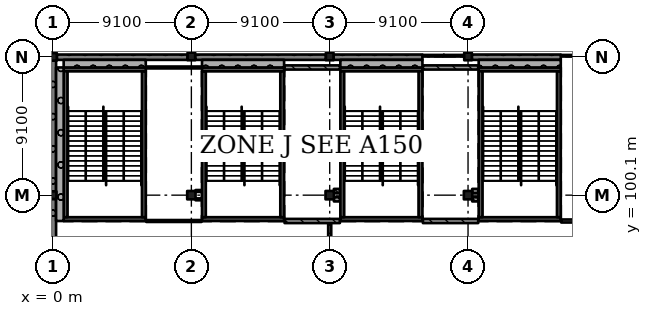
"""IFC4 building model, lengths in metres.
Left out: names, types, materials, properties, quantities, classifications, styles, units other than length and angle.
Written with IfcOpenShell. Run it as: python <this file> out.ifc"""

import sys

from ifc_helpers import new_model, si_unit, direction, frame, frame_2d, origin, origin_2d, place, context, subcontext, project, spatial, rectangle, extrude, element, fill, save


model = new_model("IFC4")
c1 = context("Model", 3, precision=1e-05, world=origin(), true_north=direction((0.0, 1.0)))
c2 = subcontext(c1, "Body", "Model", "MODEL_VIEW")
j1 = project(units=[si_unit("LENGTHUNIT", "METRE"), si_unit("PLANEANGLEUNIT", "RADIAN")], contexts=[c1])
p1 = place(None, origin())
s1 = spatial("IfcSite", under=j1, at=p1, CompositionType="ELEMENT")
p2 = place(p1, origin())
s2 = spatial("IfcBuilding", under=s1, at=p2, CompositionType="ELEMENT")
p3 = place(p2, frame((0.0, 0.0, 15.47)))
s3 = spatial("IfcBuildingStorey", under=s2, at=p3, CompositionType="ELEMENT", Elevation=15.47)
for number, where, z_axis, x_axis in (
    (1, (-0.025, 100.1, 0.0), (0.0, 0.0, 1.0), (1.0, 0.0, 0.0)),
    (2, (0.0, 109.2, 0.0), (0.0, 0.0, 1.0), (1.0, 0.0, 0.0)),
):
    element("IfcColumn", number, at=place(p3, frame(where, z_axis=z_axis, x_axis=x_axis)), inside=s3, PredefinedType="COLUMN", context=c2, shape_type="SweptSolid", body=[
        extrude(rectangle(XDim=0.5, YDim=0.5, at=origin_2d()), origin(), (0.0, 0.0, 1.0), 4.55),
    ])
p4 = place(p3, frame((9.1, 100.1, 0.0), z_axis=(0.0, 0.0, 1.0), x_axis=(1.0, 0.0, 0.0)))
e3 = element("IfcColumn", 3, at=p4, inside=s3, PredefinedType="COLUMN", context=c2, shape_type="SweptSolid", body=[
    extrude(rectangle(XDim=0.55, YDim=0.55, at=origin_2d()), origin(), (0.0, 0.0, 1.0), 4.55),
])
p5 = place(p3, frame((9.1, 109.225, 0.0), z_axis=(0.0, 0.0, 1.0), x_axis=(1.0, 0.0, 0.0)))
e4 = element("IfcColumn", 4, at=p5, inside=s3, PredefinedType="COLUMN", context=c2, shape_type="SweptSolid", body=[
    extrude(rectangle(XDim=0.5, YDim=0.5, at=origin_2d()), origin(), (0.0, 0.0, 1.0), 4.55),
])
p6 = place(p3, frame((18.2, 100.1, 0.0), z_axis=(0.0, 0.0, 1.0), x_axis=(1.0, 0.0, 0.0)))
e5 = element("IfcColumn", 5, at=p6, inside=s3, PredefinedType="COLUMN", context=c2, shape_type="SweptSolid", body=[
    extrude(rectangle(XDim=0.55, YDim=0.55, at=origin_2d()), origin(), (0.0, 0.0, 1.0), 4.55),
])
p7 = place(p3, frame((18.2, 109.225, 0.0), z_axis=(0.0, 0.0, 1.0), x_axis=(1.0, 0.0, 0.0)))
e6 = element("IfcColumn", 6, at=p7, inside=s3, PredefinedType="COLUMN", context=c2, shape_type="SweptSolid", body=[
    extrude(rectangle(XDim=0.5, YDim=0.5, at=origin_2d()), origin(), (0.0, 0.0, 1.0), 4.55),
])
p8 = place(p3, frame((27.3, 100.1, 0.0), z_axis=(0.0, 0.0, 1.0), x_axis=(1.0, 0.0, 0.0)))
e7 = element("IfcColumn", 7, at=p8, inside=s3, PredefinedType="COLUMN", context=c2, shape_type="SweptSolid", body=[
    extrude(rectangle(XDim=0.55, YDim=0.55, at=origin_2d()), origin(), (0.0, 0.0, 1.0), 4.55),
])
p9 = place(p3, frame((27.3, 109.225, 0.0), z_axis=(0.0, 0.0, 1.0), x_axis=(1.0, 0.0, 0.0)))
e8 = element("IfcColumn", 8, at=p9, inside=s3, PredefinedType="COLUMN", context=c2, shape_type="SweptSolid", body=[
    extrude(rectangle(XDim=0.5, YDim=0.5, at=origin_2d()), origin(), (0.0, 0.0, 1.0), 4.55),
])
p10 = place(p3, frame((6.1, 98.525, 0.0), z_axis=(0.0, 0.0, 1.0), x_axis=(-1.0, 0.0, 0.0)))
e9 = element("IfcWall", 9, at=p10, inside=s3, PredefinedType="SHEAR", context=c2, shape_type="SweptSolid", body=[
    extrude(rectangle(XDim=5.4, YDim=0.25, at=frame_2d((2.7, 0.0))), origin(), (0.0, 0.0, 1.0), 4.55),
])
p11 = place(p10, frame((1.5, 0.0, 0.0)))
e10 = element("IfcOpeningElement", 10, at=p11, cuts=e9, PredefinedType="OPENING", context=c2, shape_type="SweptSolid", body=[
    extrude(rectangle(XDim=2.4, YDim=2.1, at=frame_2d((1.2, 1.05))), frame((0.0, 0.135, 0.0), z_axis=(0.0, -1.0, 0.0), x_axis=(1.0, 0.0, 0.0)), (0.0, 0.0, 1.0), 0.27),
])
p12 = place(p3, frame((6.1, 108.375, 0.0), z_axis=(0.0, 0.0, 1.0), x_axis=(-1.0, 0.0, 0.0)))
e11 = element("IfcWall", 11, at=p12, inside=s3, PredefinedType="SHEAR", context=c2, shape_type="SweptSolid", body=[
    extrude(rectangle(XDim=5.4, YDim=0.25, at=frame_2d((2.7, 0.0))), origin(), (0.0, 0.0, 1.0), 4.55),
])
for number, where, z_axis, x_axis in (
    (12, (0.825, 108.25, 0.0), (0.0, 0.0, 1.0), (0.0, -1.0, 0.0)),
    (13, (5.975, 108.25, 0.0), (0.0, 0.0, 1.0), (0.0, -1.0, 0.0)),
):
    element("IfcWall", number, at=place(p3, frame(where, z_axis=z_axis, x_axis=x_axis)), inside=s3, PredefinedType="SHEAR", context=c2, shape_type="SweptSolid", body=[
        extrude(rectangle(XDim=9.6, YDim=0.25, at=frame_2d((4.8, 0.0))), origin(), (0.0, 0.0, 1.0), 4.55),
    ])
p13 = place(p3, frame((15.2, 98.525, 0.0), z_axis=(0.0, 0.0, 1.0), x_axis=(-1.0, 0.0, 0.0)))
e14 = element("IfcWall", 14, at=p13, inside=s3, PredefinedType="SHEAR", context=c2, shape_type="SweptSolid", body=[
    extrude(rectangle(XDim=5.4, YDim=0.25, at=frame_2d((2.7, 0.0))), origin(), (0.0, 0.0, 1.0), 4.55),
])
p14 = place(p13, frame((1.5, 0.0, 0.0)))
e15 = element("IfcOpeningElement", 15, at=p14, cuts=e14, PredefinedType="OPENING", context=c2, shape_type="SweptSolid", body=[
    extrude(rectangle(XDim=2.4, YDim=2.1, at=frame_2d((1.2, 1.05))), frame((0.0, 0.135, 0.0), z_axis=(0.0, -1.0, 0.0), x_axis=(1.0, 0.0, 0.0)), (0.0, 0.0, 1.0), 0.27),
])
p15 = place(p3, frame((15.2, 108.375, 0.0), z_axis=(0.0, 0.0, 1.0), x_axis=(-1.0, 0.0, 0.0)))
e16 = element("IfcWall", 16, at=p15, inside=s3, PredefinedType="SHEAR", context=c2, shape_type="SweptSolid", body=[
    extrude(rectangle(XDim=5.4, YDim=0.25, at=frame_2d((2.7, 0.0))), origin(), (0.0, 0.0, 1.0), 4.55),
])
for number, where, z_axis, x_axis in (
    (17, (9.925, 108.25, 0.0), (0.0, 0.0, 1.0), (0.0, -1.0, 0.0)),
    (18, (15.075, 108.25, 0.0), (0.0, 0.0, 1.0), (0.0, -1.0, 0.0)),
):
    element("IfcWall", number, at=place(p3, frame(where, z_axis=z_axis, x_axis=x_axis)), inside=s3, PredefinedType="SHEAR", context=c2, shape_type="SweptSolid", body=[
        extrude(rectangle(XDim=9.6, YDim=0.25, at=frame_2d((4.8, 0.0))), origin(), (0.0, 0.0, 1.0), 4.55),
    ])
p16 = place(p3, frame((24.3, 98.525, 0.0), z_axis=(0.0, 0.0, 1.0), x_axis=(-1.0, 0.0, 0.0)))
e19 = element("IfcWall", 19, at=p16, inside=s3, PredefinedType="SHEAR", context=c2, shape_type="SweptSolid", body=[
    extrude(rectangle(XDim=5.4, YDim=0.25, at=frame_2d((2.7, 0.0))), origin(), (0.0, 0.0, 1.0), 4.55),
])
p17 = place(p16, frame((1.5, 0.0, 0.0)))
e20 = element("IfcOpeningElement", 20, at=p17, cuts=e19, PredefinedType="OPENING", context=c2, shape_type="SweptSolid", body=[
    extrude(rectangle(XDim=2.4, YDim=2.1, at=frame_2d((1.2, 1.05))), frame((0.0, 0.135, 0.0), z_axis=(0.0, -1.0, 0.0), x_axis=(1.0, 0.0, 0.0)), (0.0, 0.0, 1.0), 0.27),
])
p18 = place(p3, frame((24.3, 108.375, 0.0), z_axis=(0.0, 0.0, 1.0), x_axis=(-1.0, 0.0, 0.0)))
e21 = element("IfcWall", 21, at=p18, inside=s3, PredefinedType="SHEAR", context=c2, shape_type="SweptSolid", body=[
    extrude(rectangle(XDim=5.4, YDim=0.25, at=frame_2d((2.7, 0.0))), origin(), (0.0, 0.0, 1.0), 4.55),
])
for number, where, z_axis, x_axis in (
    (22, (19.025, 108.25, 0.0), (0.0, 0.0, 1.0), (0.0, -1.0, 0.0)),
    (23, (24.175, 108.25, 0.0), (0.0, 0.0, 1.0), (0.0, -1.0, 0.0)),
):
    element("IfcWall", number, at=place(p3, frame(where, z_axis=z_axis, x_axis=x_axis)), inside=s3, PredefinedType="SHEAR", context=c2, shape_type="SweptSolid", body=[
        extrude(rectangle(XDim=9.6, YDim=0.25, at=frame_2d((4.8, 0.0))), origin(), (0.0, 0.0, 1.0), 4.55),
    ])
p19 = place(p3, frame((33.4, 98.525, 0.0), z_axis=(0.0, 0.0, 1.0), x_axis=(-1.0, 0.0, 0.0)))
e24 = element("IfcWall", 24, at=p19, inside=s3, PredefinedType="SHEAR", context=c2, shape_type="SweptSolid", body=[
    extrude(rectangle(XDim=5.4, YDim=0.25, at=frame_2d((2.7, 0.0))), origin(), (0.0, 0.0, 1.0), 4.55),
])
p20 = place(p19, frame((1.5, 0.0, 0.0)))
e25 = element("IfcOpeningElement", 25, at=p20, cuts=e24, PredefinedType="OPENING", context=c2, shape_type="SweptSolid", body=[
    extrude(rectangle(XDim=2.4, YDim=2.1, at=frame_2d((1.2, 1.05))), frame((0.0, 0.135, 0.0), z_axis=(0.0, -1.0, 0.0), x_axis=(1.0, 0.0, 0.0)), (0.0, 0.0, 1.0), 0.27),
])
p21 = place(p3, frame((33.4, 108.375, 0.0), z_axis=(0.0, 0.0, 1.0), x_axis=(-1.0, 0.0, 0.0)))
e26 = element("IfcWall", 26, at=p21, inside=s3, PredefinedType="SHEAR", context=c2, shape_type="SweptSolid", body=[
    extrude(rectangle(XDim=5.4, YDim=0.25, at=frame_2d((2.7, 0.0))), origin(), (0.0, 0.0, 1.0), 4.55),
])
for number, where, z_axis, x_axis in (
    (27, (28.125, 108.25, 0.0), (0.0, 0.0, 1.0), (0.0, -1.0, 0.0)),
    (28, (33.275, 108.25, 0.0), (0.0, 0.0, 1.0), (0.0, -1.0, 0.0)),
):
    element("IfcWall", number, at=place(p3, frame(where, z_axis=z_axis, x_axis=x_axis)), inside=s3, PredefinedType="SHEAR", context=c2, shape_type="SweptSolid", body=[
        extrude(rectangle(XDim=9.6, YDim=0.25, at=frame_2d((4.8, 0.0))), origin(), (0.0, 0.0, 1.0), 4.55),
    ])
p22 = place(p3, frame((33.4, 109.175, 0.0), z_axis=(0.0, 0.0, 1.0), x_axis=(-1.0, 0.0, 0.0)))
e29 = element("IfcWall", 29, at=p22, inside=s3, PredefinedType="SOLIDWALL", context=c2, shape_type="SweptSolid", body=[
    extrude(rectangle(XDim=5.85, YDim=0.35, at=frame_2d((2.925, 0.0))), origin(), (0.0, 0.0, 1.0), 3.55),
])
p23 = place(p3, frame((24.3, 109.175, 0.0), z_axis=(0.0, 0.0, 1.0), x_axis=(-1.0, 0.0, 0.0)))
e30 = element("IfcWall", 30, at=p23, inside=s3, PredefinedType="SOLIDWALL", context=c2, shape_type="SweptSolid", body=[
    extrude(rectangle(XDim=5.85, YDim=0.35, at=frame_2d((2.925, 0.0))), origin(), (0.0, 0.0, 1.0), 3.55),
])
p24 = place(p3, frame((17.95, 109.175, 0.0), z_axis=(0.0, 0.0, 1.0), x_axis=(-1.0, 0.0, 0.0)))
e31 = element("IfcWall", 31, at=p24, inside=s3, PredefinedType="SOLIDWALL", context=c2, shape_type="SweptSolid", body=[
    extrude(rectangle(XDim=8.6, YDim=0.35, at=frame_2d((4.3, 0.0))), origin(), (0.0, 0.0, 1.0), 3.55),
])
p25 = place(p3, frame((8.85, 109.175, 0.0), z_axis=(0.0, 0.0, 1.0), x_axis=(-1.0, 0.0, 0.0)))
e32 = element("IfcWall", 32, at=p25, inside=s3, PredefinedType="SOLIDWALL", context=c2, shape_type="SweptSolid", body=[
    extrude(rectangle(XDim=8.6, YDim=0.35, at=frame_2d((4.3, 0.0))), origin(), (0.0, 0.0, 1.0), 3.55),
])
p26 = place(p3, frame((0.025, 108.95, 0.0), z_axis=(0.0, 0.0, 1.0), x_axis=(0.0, -1.0, 0.0)))
e33 = element("IfcWall", 33, at=p26, inside=s3, PredefinedType="SOLIDWALL", context=c2, shape_type="SweptSolid", body=[
    extrude(rectangle(XDim=8.6, YDim=0.35, at=frame_2d((4.3, 0.0))), origin(), (0.0, 0.0, 1.0), 3.55),
])
p27 = place(p3, frame((0.025, 99.85, 0.0), z_axis=(0.0, 0.0, 1.0), x_axis=(0.0, -1.0, 0.0)))
e34 = element("IfcWall", 34, at=p27, inside=s3, PredefinedType="SOLIDWALL", context=c2, shape_type="SweptSolid", body=[
    extrude(rectangle(XDim=8.575, YDim=0.35, at=frame_2d((4.288, 0.0))), origin(), (0.0, 0.0, 1.0), 3.55),
])
p28 = place(p3, frame((0.7, 108.75, 0.0), z_axis=(0.0, 0.0, 1.0), x_axis=(1.0, 0.0, 0.0)))
e35 = element("IfcWall", 35, at=p28, inside=s3, PredefinedType="SOLIDWALL", context=c2, shape_type="SweptSolid", body=[
    extrude(rectangle(XDim=5.4, YDim=0.5, at=frame_2d((2.7, 0.0))), origin(), (0.0, 0.0, 1.0), 4.3),
])
p29 = place(p3, frame((0.45, 98.4, 0.0), z_axis=(0.0, 0.0, 1.0), x_axis=(0.0, 1.0, 0.0)))
e36 = element("IfcWall", 36, at=p29, inside=s3, PredefinedType="SOLIDWALL", context=c2, shape_type="SweptSolid", body=[
    extrude(rectangle(XDim=10.1, YDim=0.5, at=frame_2d((5.05, 0.0))), origin(), (0.0, 0.0, 1.0), 4.3),
])
p30 = place(p3, frame((9.8, 108.75, 0.0), z_axis=(0.0, 0.0, 1.0), x_axis=(1.0, 0.0, 0.0)))
e37 = element("IfcWall", 37, at=p30, inside=s3, PredefinedType="SOLIDWALL", context=c2, shape_type="SweptSolid", body=[
    extrude(rectangle(XDim=5.4, YDim=0.5, at=frame_2d((2.7, 0.0))), origin(), (0.0, 0.0, 1.0), 4.3),
])
p31 = place(p3, frame((18.9, 108.75, 0.0), z_axis=(0.0, 0.0, 1.0), x_axis=(1.0, 0.0, 0.0)))
e38 = element("IfcWall", 38, at=p31, inside=s3, PredefinedType="SOLIDWALL", context=c2, shape_type="SweptSolid", body=[
    extrude(rectangle(XDim=5.4, YDim=0.5, at=frame_2d((2.7, 0.0))), origin(), (0.0, 0.0, 1.0), 4.3),
])
p32 = place(p3, frame((28.0, 108.75, 0.0), z_axis=(0.0, 0.0, 1.0), x_axis=(1.0, 0.0, 0.0)))
e39 = element("IfcWall", 39, at=p32, inside=s3, PredefinedType="SOLIDWALL", context=c2, shape_type="SweptSolid", body=[
    extrude(rectangle(XDim=5.4, YDim=0.5, at=frame_2d((2.7, 0.0))), origin(), (0.0, 0.0, 1.0), 4.3),
])
p33 = place(p3, frame((6.13, 98.4, 0.0), z_axis=(0.0, 0.0, 1.0), x_axis=(1.0, 0.0, 0.0)))
e40 = element("IfcWall", 40, at=p33, inside=s3, PredefinedType="PARTITIONING", context=c2, shape_type="SweptSolid", body=[
    extrude(rectangle(XDim=3.64, YDim=0.125, at=frame_2d((1.82, 0.0))), origin(), (0.0, 0.0, 1.0), 4.3),
])
p34 = place(p33, frame((1.35, 0.0, 0.0)))
e41 = element("IfcOpeningElement", 41, at=p34, cuts=e40, PredefinedType="OPENING", context=c2, shape_type="SweptSolid", body=[
    extrude(rectangle(XDim=0.9, YDim=2.1, at=frame_2d((0.45, 1.05))), frame((0.0, 0.073, 0.0), z_axis=(0.0, -1.0, 0.0), x_axis=(1.0, 0.0, 0.0)), (0.0, 0.0, 1.0), 0.145),
])
p35 = place(p3, frame((6.13, 108.5, 0.0), z_axis=(0.0, 0.0, 1.0), x_axis=(1.0, 0.0, 0.0)))
e42 = element("IfcWall", 42, at=p35, inside=s3, PredefinedType="PARTITIONING", context=c2, shape_type="SweptSolid", body=[
    extrude(rectangle(XDim=3.64, YDim=0.125, at=frame_2d((1.82, 0.0))), origin(), (0.0, 0.0, 1.0), 4.3),
])
for number, where, z_axis, x_axis in (
    (43, (9.375, 99.825, 0.0), (0.0, 0.0, 1.0), (1.0, 0.0, 0.0)),
    (44, (9.77, 100.375, 0.0), (0.0, 0.0, 1.0), (-1.0, 0.0, 0.0)),
):
    element("IfcWall", number, at=place(p3, frame(where, z_axis=z_axis, x_axis=x_axis)), inside=s3, PredefinedType="PARTITIONING", context=c2, shape_type="SweptSolid", body=[
        extrude(rectangle(XDim=0.395, YDim=0.125, at=frame_2d((0.198, 0.0))), origin(), (0.0, 0.0, 1.0), 4.3),
    ])
p36 = place(p3, frame((15.23, 98.4, 0.0), z_axis=(0.0, 0.0, 1.0), x_axis=(1.0, 0.0, 0.0)))
e45 = element("IfcWall", 45, at=p36, inside=s3, PredefinedType="SOLIDWALL", context=c2, shape_type="SweptSolid", body=[
    extrude(rectangle(XDim=3.64, YDim=0.275, at=frame_2d((1.82, 0.0))), origin(), (0.0, 0.0, 1.0), 4.3),
])
p37 = place(p36, frame((0.85, 0.0, 0.0)))
e46 = element("IfcOpeningElement", 46, at=p37, cuts=e45, PredefinedType="OPENING", context=c2, shape_type="SweptSolid", body=[
    extrude(rectangle(XDim=1.2, YDim=2.4, at=frame_2d((0.6, 1.2))), frame((0.0, 0.147, 0.0), z_axis=(0.0, -1.0, 0.0), x_axis=(1.0, 0.0, 0.0)), (0.0, 0.0, 1.0), 0.295),
])
p38 = place(p3, frame((15.23, 108.5, 0.0), z_axis=(0.0, 0.0, 1.0), x_axis=(1.0, 0.0, 0.0)))
e47 = element("IfcWall", 47, at=p38, inside=s3, PredefinedType="SOLIDWALL", context=c2, shape_type="SweptSolid", body=[
    extrude(rectangle(XDim=3.64, YDim=0.275, at=frame_2d((1.82, 0.0))), origin(), (0.0, 0.0, 1.0), 4.3),
])
p39 = place(p3, frame((18.2, 98.262, 0.0), z_axis=(0.0, 0.0, 1.0), x_axis=(0.0, -1.0, 0.0)))
e48 = element("IfcWall", 48, at=p39, inside=s3, PredefinedType="PARTITIONING", context=c2, shape_type="SweptSolid", body=[
    extrude(rectangle(XDim=6.912, YDim=0.2, at=frame_2d((3.456, 0.0))), origin(), (0.0, 0.0, 1.0), 3.55),
])
p40 = place(p39, frame((0.85, 0.0, 0.0)))
e49 = element("IfcOpeningElement", 49, at=p40, cuts=e48, PredefinedType="OPENING", context=c2, shape_type="SweptSolid", body=[
    extrude(rectangle(XDim=1.8, YDim=2.4, at=frame_2d((0.9, 1.2))), frame((0.0, 0.11, 0.0), z_axis=(0.0, -1.0, 0.0), x_axis=(1.0, 0.0, 0.0)), (0.0, 0.0, 1.0), 0.22),
])
p41 = place(p39, frame((4.25, 0.0, 0.0)))
e50 = element("IfcOpeningElement", 50, at=p41, cuts=e48, PredefinedType="OPENING", context=c2, shape_type="SweptSolid", body=[
    extrude(rectangle(XDim=1.8, YDim=2.4, at=frame_2d((0.9, 1.2))), frame((0.0, 0.11, 0.0), z_axis=(0.0, -1.0, 0.0), x_axis=(1.0, 0.0, 0.0)), (0.0, 0.0, 1.0), 0.22),
])
for number, where, z_axis, x_axis in (
    (51, (18.475, 99.825, 0.0), (0.0, 0.0, 1.0), (1.0, 0.0, 0.0)),
    (52, (18.87, 100.375, 0.0), (0.0, 0.0, 1.0), (-1.0, 0.0, 0.0)),
):
    element("IfcWall", number, at=place(p3, frame(where, z_axis=z_axis, x_axis=x_axis)), inside=s3, PredefinedType="SOLIDWALL", context=c2, shape_type="SweptSolid", body=[
        extrude(rectangle(XDim=0.395, YDim=0.275, at=frame_2d((0.198, 0.0))), origin(), (0.0, 0.0, 1.0), 4.3),
    ])
p42 = place(p3, frame((24.33, 98.4, 0.0), z_axis=(0.0, 0.0, 1.0), x_axis=(1.0, 0.0, 0.0)))
e53 = element("IfcWall", 53, at=p42, inside=s3, PredefinedType="SOLIDWALL", context=c2, shape_type="SweptSolid", body=[
    extrude(rectangle(XDim=3.64, YDim=0.275, at=frame_2d((1.82, 0.0))), origin(), (0.0, 0.0, 1.0), 4.3),
])
p43 = place(p42, frame((1.25, 0.0, 0.0)))
e54 = element("IfcOpeningElement", 54, at=p43, cuts=e53, PredefinedType="OPENING", context=c2, shape_type="SweptSolid", body=[
    extrude(rectangle(XDim=1.2, YDim=2.4, at=frame_2d((0.6, 1.2))), frame((0.0, 0.147, 0.0), z_axis=(0.0, -1.0, 0.0), x_axis=(1.0, 0.0, 0.0)), (0.0, 0.0, 1.0), 0.295),
])
p44 = place(p3, frame((24.33, 108.5, 0.0), z_axis=(0.0, 0.0, 1.0), x_axis=(1.0, 0.0, 0.0)))
e55 = element("IfcWall", 55, at=p44, inside=s3, PredefinedType="SOLIDWALL", context=c2, shape_type="SweptSolid", body=[
    extrude(rectangle(XDim=3.64, YDim=0.275, at=frame_2d((1.82, 0.0))), origin(), (0.0, 0.0, 1.0), 4.3),
])
for number, where, z_axis, x_axis in (
    (56, (27.575, 99.825, 0.0), (0.0, 0.0, 1.0), (1.0, 0.0, 0.0)),
    (57, (27.97, 100.375, 0.0), (0.0, 0.0, 1.0), (-1.0, 0.0, 0.0)),
):
    element("IfcWall", number, at=place(p3, frame(where, z_axis=z_axis, x_axis=x_axis)), inside=s3, PredefinedType="SOLIDWALL", context=c2, shape_type="SweptSolid", body=[
        extrude(rectangle(XDim=0.395, YDim=0.275, at=frame_2d((0.198, 0.0))), origin(), (0.0, 0.0, 1.0), 4.3),
    ])
p45 = place(p3, frame((33.43, 98.4, 0.0), z_axis=(0.0, 0.0, 1.0), x_axis=(1.0, 0.0, 0.0)))
e58 = element("IfcWall", 58, at=p45, inside=s3, PredefinedType="PARTITIONING", context=c2, shape_type="SweptSolid", body=[
    extrude(rectangle(XDim=2.745, YDim=0.2, at=frame_2d((1.373, 0.0))), origin(), (0.0, 0.0, 1.0), 4.3),
])
p46 = place(p45, frame((0.45, 0.0, 0.0)))
e59 = element("IfcOpeningElement", 59, at=p46, cuts=e58, PredefinedType="OPENING", context=c2, shape_type="SweptSolid", body=[
    extrude(rectangle(XDim=1.8, YDim=2.4, at=frame_2d((0.9, 1.2))), frame((0.0, 0.11, 0.0), z_axis=(0.0, -1.0, 0.0), x_axis=(1.0, 0.0, 0.0)), (0.0, 0.0, 1.0), 0.22),
])
p47 = place(p34, origin())
e60 = element("IfcDoor", 60, at=p47, inside=s3, OperationType="SINGLE_SWING_RIGHT", PredefinedType="DOOR", context=c2, shape_type="SweptSolid", body=[
    extrude(rectangle(XDim=0.9, YDim=2.1, at=frame_2d((0.45, 1.05))), frame((0.0, 0.025, 0.0), z_axis=(0.0, -1.0, 0.0), x_axis=(1.0, 0.0, 0.0)), (0.0, 0.0, 1.0), 0.05),
])
fill(e41, e60)
p48 = place(p37, origin())
e61 = element("IfcDoor", 61, at=p48, inside=s3, OperationType="SINGLE_SWING_RIGHT", PredefinedType="DOOR", context=c2, shape_type="SweptSolid", body=[
    extrude(rectangle(XDim=1.2, YDim=2.4, at=frame_2d((0.6, 1.2))), frame((0.0, 0.025, 0.0), z_axis=(0.0, -1.0, 0.0), x_axis=(1.0, 0.0, 0.0)), (0.0, 0.0, 1.0), 0.05),
])
fill(e46, e61)
p49 = place(p43, origin())
e62 = element("IfcDoor", 62, at=p49, inside=s3, OperationType="SINGLE_SWING_LEFT", PredefinedType="DOOR", context=c2, shape_type="SweptSolid", body=[
    extrude(rectangle(XDim=1.2, YDim=2.4, at=frame_2d((0.6, 1.2))), frame((0.0, 0.025, 0.0), z_axis=(0.0, -1.0, 0.0), x_axis=(1.0, 0.0, 0.0)), (0.0, 0.0, 1.0), 0.05),
])
fill(e54, e62)
p50 = place(p40, origin())
e63 = element("IfcDoor", 63, at=p50, inside=s3, OperationType="DOUBLE_DOOR_SINGLE_SWING", PredefinedType="DOOR", context=c2, shape_type="SweptSolid", body=[
    extrude(rectangle(XDim=1.8, YDim=2.4, at=frame_2d((0.9, 1.2))), frame((0.0, 0.025, 0.0), z_axis=(0.0, -1.0, 0.0), x_axis=(1.0, 0.0, 0.0)), (0.0, 0.0, 1.0), 0.05),
])
fill(e49, e63)
p51 = place(p46, origin())
e64 = element("IfcDoor", 64, at=p51, inside=s3, OperationType="DOUBLE_DOOR_SINGLE_SWING", PredefinedType="DOOR", context=c2, shape_type="SweptSolid", body=[
    extrude(rectangle(XDim=1.8, YDim=2.4, at=frame_2d((0.9, 1.2))), frame((0.0, 0.025, 0.0), z_axis=(0.0, -1.0, 0.0), x_axis=(1.0, 0.0, 0.0)), (0.0, 0.0, 1.0), 0.05),
])
fill(e59, e64)
p52 = place(p11, origin())
e65 = element("IfcDoor", 65, at=p52, inside=s3, OperationType="DOUBLE_DOOR_SINGLE_SWING", PredefinedType="DOOR", context=c2, shape_type="SweptSolid", body=[
    extrude(rectangle(XDim=2.4, YDim=2.1, at=frame_2d((1.2, 1.05))), frame((0.0, 0.025, 0.0), z_axis=(0.0, -1.0, 0.0), x_axis=(1.0, 0.0, 0.0)), (0.0, 0.0, 1.0), 0.05),
])
fill(e10, e65)
p53 = place(p14, origin())
e66 = element("IfcDoor", 66, at=p53, inside=s3, OperationType="DOUBLE_DOOR_SINGLE_SWING", PredefinedType="DOOR", context=c2, shape_type="SweptSolid", body=[
    extrude(rectangle(XDim=2.4, YDim=2.1, at=frame_2d((1.2, 1.05))), frame((0.0, 0.025, 0.0), z_axis=(0.0, -1.0, 0.0), x_axis=(1.0, 0.0, 0.0)), (0.0, 0.0, 1.0), 0.05),
])
fill(e15, e66)
p54 = place(p17, origin())
e67 = element("IfcDoor", 67, at=p54, inside=s3, OperationType="DOUBLE_DOOR_SINGLE_SWING", PredefinedType="DOOR", context=c2, shape_type="SweptSolid", body=[
    extrude(rectangle(XDim=2.4, YDim=2.1, at=frame_2d((1.2, 1.05))), frame((0.0, 0.025, 0.0), z_axis=(0.0, -1.0, 0.0), x_axis=(1.0, 0.0, 0.0)), (0.0, 0.0, 1.0), 0.05),
])
fill(e20, e67)
p55 = place(p20, origin())
e68 = element("IfcDoor", 68, at=p55, inside=s3, OperationType="DOUBLE_DOOR_SINGLE_SWING", PredefinedType="DOOR", context=c2, shape_type="SweptSolid", body=[
    extrude(rectangle(XDim=2.4, YDim=2.1, at=frame_2d((1.2, 1.05))), frame((0.0, 0.025, 0.0), z_axis=(0.0, -1.0, 0.0), x_axis=(1.0, 0.0, 0.0)), (0.0, 0.0, 1.0), 0.05),
])
fill(e25, e68)
save(model, sys.argv[1])
